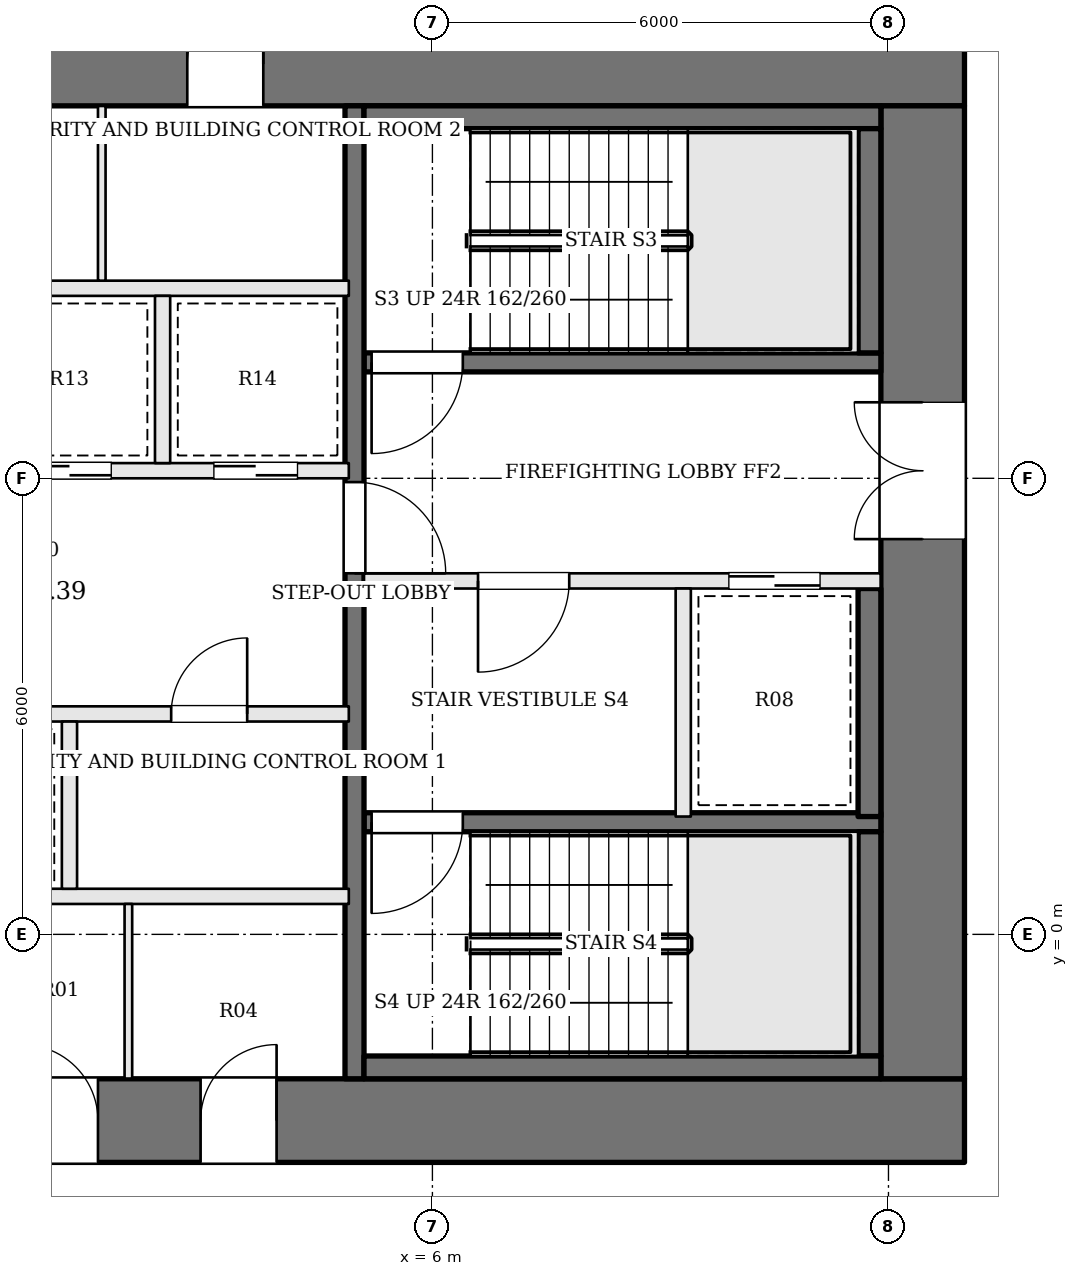
"""IFC4 building model, lengths in metres.
Left out: names, types, materials, properties, quantities, classifications, styles, units other than length and angle.
Written with IfcOpenShell. Run it as: python <this file> out.ifc"""

import sys

from ifc_helpers import new_model, si_unit, direction, frame, frame_2d, origin, place, context, subcontext, project, spatial, rectangle, extrude, element, fill, save


model = new_model("IFC4")
c1 = context("Model", 3, precision=1e-05, world=origin(), true_north=direction((0.0, 1.0)))
c2 = subcontext(c1, "Body", "Model", "MODEL_VIEW")
j1 = project(units=[si_unit("LENGTHUNIT", "METRE"), si_unit("PLANEANGLEUNIT", "RADIAN")], contexts=[c1])
p1 = place(None, origin())
s1 = spatial("IfcSite", under=j1, at=p1, CompositionType="ELEMENT")
p2 = place(p1, origin())
s2 = spatial("IfcBuilding", under=s1, at=p2, CompositionType="ELEMENT")
p3 = place(p2, frame((0.0, 0.0, 146.1)))
s3 = spatial("IfcBuildingStorey", under=s2, at=p3, CompositionType="ELEMENT", Elevation=146.1)
p4 = place(p3, frame((-13.0, 11.45, 0.0), z_axis=(0.0, 0.0, 1.0), x_axis=(1.0, 0.0, 0.0)))
e1 = element("IfcWall", 1, at=p4, inside=s3, PredefinedType="SHEAR", context=c2, shape_type="SweptSolid", body=[
    extrude(rectangle(XDim=26.0, YDim=1.1, at=frame_2d((13.0, 0.0))), origin(), (0.0, 0.0, 1.0), 3.9),
])
p5 = place(p4, frame((8.975, 0.0, 0.0)))
e2 = element("IfcOpeningElement", 2, at=p5, cuts=e1, PredefinedType="OPENING", context=c2, shape_type="SweptSolid", body=[
    extrude(rectangle(XDim=0.7, YDim=2.1, at=frame_2d((0.35, 1.05))), frame((0.0, 0.56, 0.0), z_axis=(0.0, -1.0, 0.0), x_axis=(1.0, 0.0, 0.0)), (0.0, 0.0, 1.0), 1.12),
])
p6 = place(p4, frame((11.025, 0.0, 0.0)))
e3 = element("IfcOpeningElement", 3, at=p6, cuts=e1, PredefinedType="OPENING", context=c2, shape_type="SweptSolid", body=[
    extrude(rectangle(XDim=0.7, YDim=2.1, at=frame_2d((0.35, 1.05))), frame((0.0, 0.56, 0.0), z_axis=(0.0, -1.0, 0.0), x_axis=(1.0, 0.0, 0.0)), (0.0, 0.0, 1.0), 1.12),
])
p7 = place(p4, frame((12.925, 0.0, 0.0)))
e4 = element("IfcOpeningElement", 4, at=p7, cuts=e1, PredefinedType="OPENING", context=c2, shape_type="SweptSolid", body=[
    extrude(rectangle(XDim=1.0, YDim=2.1, at=frame_2d((0.5, 1.05))), frame((0.0, 0.56, 0.0), z_axis=(0.0, -1.0, 0.0), x_axis=(1.0, 0.0, 0.0)), (0.0, 0.0, 1.0), 1.12),
])
p8 = place(p4, frame((15.775, 0.0, 0.0)))
e5 = element("IfcOpeningElement", 5, at=p8, cuts=e1, PredefinedType="OPENING", context=c2, shape_type="SweptSolid", body=[
    extrude(rectangle(XDim=1.0, YDim=2.1, at=frame_2d((0.5, 1.05))), frame((0.0, 0.56, 0.0), z_axis=(0.0, -1.0, 0.0), x_axis=(1.0, 0.0, 0.0)), (0.0, 0.0, 1.0), 1.12),
])
p9 = place(p3, frame((-13.0, -2.45, 0.0), z_axis=(0.0, 0.0, 1.0), x_axis=(1.0, 0.0, 0.0)))
e6 = element("IfcWall", 6, at=p9, inside=s3, PredefinedType="SHEAR", context=c2, shape_type="SweptSolid", body=[
    extrude(rectangle(XDim=26.0, YDim=1.1, at=frame_2d((13.0, 0.0))), origin(), (0.0, 0.0, 1.0), 3.9),
])
p10 = place(p9, frame((8.925, 0.0, 0.0)))
e7 = element("IfcOpeningElement", 7, at=p10, cuts=e6, PredefinedType="OPENING", context=c2, shape_type="SweptSolid", body=[
    extrude(rectangle(XDim=0.9, YDim=2.1, at=frame_2d((0.45, 1.05))), frame((0.0, 0.56, 0.0), z_axis=(0.0, -1.0, 0.0), x_axis=(1.0, 0.0, 0.0)), (0.0, 0.0, 1.0), 1.12),
])
p11 = place(p9, frame((11.475, 0.0, 0.0)))
e8 = element("IfcOpeningElement", 8, at=p11, cuts=e6, PredefinedType="OPENING", context=c2, shape_type="SweptSolid", body=[
    extrude(rectangle(XDim=0.9, YDim=2.1, at=frame_2d((0.45, 1.05))), frame((0.0, 0.56, 0.0), z_axis=(0.0, -1.0, 0.0), x_axis=(1.0, 0.0, 0.0)), (0.0, 0.0, 1.0), 1.12),
])
p12 = place(p9, frame((13.6, 0.0, 0.0)))
e9 = element("IfcOpeningElement", 9, at=p12, cuts=e6, PredefinedType="OPENING", context=c2, shape_type="SweptSolid", body=[
    extrude(rectangle(XDim=1.0, YDim=2.1, at=frame_2d((0.5, 1.05))), frame((0.0, 0.56, 0.0), z_axis=(0.0, -1.0, 0.0), x_axis=(1.0, 0.0, 0.0)), (0.0, 0.0, 1.0), 1.12),
])
p13 = place(p9, frame((15.95, 0.0, 0.0)))
e10 = element("IfcOpeningElement", 10, at=p13, cuts=e6, PredefinedType="OPENING", context=c2, shape_type="SweptSolid", body=[
    extrude(rectangle(XDim=1.0, YDim=2.1, at=frame_2d((0.5, 1.05))), frame((0.0, 0.56, 0.0), z_axis=(0.0, -1.0, 0.0), x_axis=(1.0, 0.0, 0.0)), (0.0, 0.0, 1.0), 1.12),
])
p14 = place(p3, frame((12.45, -1.9, 0.0), z_axis=(0.0, 0.0, 1.0), x_axis=(0.0, 1.0, 0.0)))
e11 = element("IfcWall", 11, at=p14, inside=s3, PredefinedType="SHEAR", context=c2, shape_type="SweptSolid", body=[
    extrude(rectangle(XDim=12.8, YDim=1.1, at=frame_2d((6.4, 0.0))), origin(), (0.0, 0.0, 1.0), 3.9),
])
p15 = place(p14, frame((7.1, 0.0, 0.0)))
e12 = element("IfcOpeningElement", 12, at=p15, cuts=e11, PredefinedType="OPENING", context=c2, shape_type="SweptSolid", body=[
    extrude(rectangle(XDim=1.8, YDim=2.1, at=frame_2d((0.9, 1.05))), frame((0.0, 0.56, 0.0), z_axis=(0.0, -1.0, 0.0), x_axis=(1.0, 0.0, 0.0)), (0.0, 0.0, 1.0), 1.12),
])
p16 = place(p3, frame((11.9, 7.525, 0.0), z_axis=(0.0, 0.0, 1.0), x_axis=(-1.0, 0.0, 0.0)))
e13 = element("IfcWall", 13, at=p16, inside=s3, PredefinedType="SOLIDWALL", context=c2, shape_type="SweptSolid", body=[
    extrude(rectangle(XDim=6.8, YDim=0.25, at=frame_2d((3.4, 0.0))), origin(), (0.0, 0.0, 1.0), 3.7),
])
p17 = place(p16, frame((5.5, 0.0, 0.0)))
e14 = element("IfcOpeningElement", 14, at=p17, cuts=e13, PredefinedType="OPENING", context=c2, shape_type="SweptSolid", body=[
    extrude(rectangle(XDim=1.2, YDim=2.1, at=frame_2d((0.6, 1.05))), frame((0.0, 0.135, 0.0), z_axis=(0.0, -1.0, 0.0), x_axis=(1.0, 0.0, 0.0)), (0.0, 0.0, 1.0), 0.27),
])
p18 = place(p3, frame((11.9, 4.65, 0.0), z_axis=(0.0, 0.0, 1.0), x_axis=(-1.0, 0.0, 0.0)))
e15 = element("IfcWall", 15, at=p18, inside=s3, PredefinedType="SOLIDWALL", context=c2, shape_type="SweptSolid", body=[
    extrude(rectangle(XDim=6.8, YDim=0.2, at=frame_2d((3.4, 0.0))), origin(), (0.0, 0.0, 1.0), 3.7),
])
p19 = place(p18, frame((4.1, 0.0, 0.0)))
e16 = element("IfcOpeningElement", 16, at=p19, cuts=e15, PredefinedType="OPENING", context=c2, shape_type="SweptSolid", body=[
    extrude(rectangle(XDim=1.2, YDim=2.1, at=frame_2d((0.6, 1.05))), frame((0.0, 0.11, 0.0), z_axis=(0.0, -1.0, 0.0), x_axis=(1.0, 0.0, 0.0)), (0.0, 0.0, 1.0), 0.22),
])
p20 = place(p18, frame((0.8, 0.0, 0.0)))
e17 = element("IfcOpeningElement", 17, at=p20, cuts=e15, PredefinedType="OPENING", context=c2, shape_type="SweptSolid", body=[
    extrude(rectangle(XDim=1.2, YDim=2.1, at=frame_2d((0.6, 1.05))), frame((0.0, 0.11, 0.0), z_axis=(0.0, -1.0, 0.0), x_axis=(1.0, 0.0, 0.0)), (0.0, 0.0, 1.0), 0.22),
])
p21 = place(p3, frame((11.9, 1.475, 0.0), z_axis=(0.0, 0.0, 1.0), x_axis=(-1.0, 0.0, 0.0)))
e18 = element("IfcWall", 18, at=p21, inside=s3, PredefinedType="SOLIDWALL", context=c2, shape_type="SweptSolid", body=[
    extrude(rectangle(XDim=6.8, YDim=0.25, at=frame_2d((3.4, 0.0))), origin(), (0.0, 0.0, 1.0), 3.7),
])
p22 = place(p21, frame((5.5, 0.0, 0.0)))
e19 = element("IfcOpeningElement", 19, at=p22, cuts=e18, PredefinedType="OPENING", context=c2, shape_type="SweptSolid", body=[
    extrude(rectangle(XDim=1.2, YDim=2.1, at=frame_2d((0.6, 1.05))), frame((0.0, 0.135, 0.0), z_axis=(0.0, -1.0, 0.0), x_axis=(1.0, 0.0, 0.0)), (0.0, 0.0, 1.0), 0.27),
])
p23 = place(p3, frame((9.3, 4.55, 0.0), z_axis=(0.0, 0.0, 1.0), x_axis=(0.0, -1.0, 0.0)))
e20 = element("IfcWall", 20, at=p23, inside=s3, PredefinedType="SOLIDWALL", context=c2, shape_type="SweptSolid", body=[
    extrude(rectangle(XDim=3.0, YDim=0.2, at=frame_2d((1.5, 0.0))), origin(), (0.0, 0.0, 1.0), 3.7),
])
p24 = place(p3, frame((4.975, 10.9, 0.0), z_axis=(0.0, 0.0, 1.0), x_axis=(0.0, -1.0, 0.0)))
e21 = element("IfcWall", 21, at=p24, inside=s3, PredefinedType="SOLIDWALL", context=c2, shape_type="SweptSolid", body=[
    extrude(rectangle(XDim=12.8, YDim=0.25, at=frame_2d((6.4, 0.0))), origin(), (0.0, 0.0, 1.0), 3.7),
])
p25 = place(p24, frame((4.95, 0.0, 0.0)))
e22 = element("IfcOpeningElement", 22, at=p25, cuts=e21, PredefinedType="OPENING", context=c2, shape_type="SweptSolid", body=[
    extrude(rectangle(XDim=1.2, YDim=2.1, at=frame_2d((0.6, 1.05))), frame((0.0, 0.135, 0.0), z_axis=(0.0, -1.0, 0.0), x_axis=(1.0, 0.0, 0.0)), (0.0, 0.0, 1.0), 0.27),
])
p26 = place(p3, frame((11.9, 10.75, 0.0), z_axis=(0.0, 0.0, 1.0), x_axis=(-1.0, 0.0, 0.0)))
e23 = element("IfcWall", 23, at=p26, inside=s3, PredefinedType="SOLIDWALL", context=c2, shape_type="SweptSolid", body=[
    extrude(rectangle(XDim=6.8, YDim=0.3, at=frame_2d((3.4, 0.0))), origin(), (0.0, 0.0, 1.0), 3.7),
])
p27 = place(p3, frame((11.75, 10.6, 0.0), z_axis=(0.0, 0.0, 1.0), x_axis=(0.0, -1.0, 0.0)))
e24 = element("IfcWall", 24, at=p27, inside=s3, PredefinedType="SOLIDWALL", context=c2, shape_type="SweptSolid", body=[
    extrude(rectangle(XDim=2.95, YDim=0.3, at=frame_2d((1.475, 0.0))), origin(), (0.0, 0.0, 1.0), 3.7),
])
p28 = place(p3, frame((11.75, 4.55, 0.0), z_axis=(0.0, 0.0, 1.0), x_axis=(0.0, -1.0, 0.0)))
e25 = element("IfcWall", 25, at=p28, inside=s3, PredefinedType="SOLIDWALL", context=c2, shape_type="SweptSolid", body=[
    extrude(rectangle(XDim=3.0, YDim=0.3, at=frame_2d((1.5, 0.0))), origin(), (0.0, 0.0, 1.0), 3.7),
])
p29 = place(p3, frame((11.75, 1.35, 0.0), z_axis=(0.0, 0.0, 1.0), x_axis=(0.0, -1.0, 0.0)))
e26 = element("IfcWall", 26, at=p29, inside=s3, PredefinedType="SOLIDWALL", context=c2, shape_type="SweptSolid", body=[
    extrude(rectangle(XDim=2.95, YDim=0.3, at=frame_2d((1.475, 0.0))), origin(), (0.0, 0.0, 1.0), 3.7),
])
p30 = place(p3, frame((11.9, -1.75, 0.0), z_axis=(0.0, 0.0, 1.0), x_axis=(-1.0, 0.0, 0.0)))
e27 = element("IfcWall", 27, at=p30, inside=s3, PredefinedType="SOLIDWALL", context=c2, shape_type="SweptSolid", body=[
    extrude(rectangle(XDim=6.8, YDim=0.3, at=frame_2d((3.4, 0.0))), origin(), (0.0, 0.0, 1.0), 3.7),
])
p31 = place(p3, frame((-4.9, 0.5, 0.0), z_axis=(0.0, 0.0, 1.0), x_axis=(1.0, 0.0, 0.0)))
e28 = element("IfcWall", 28, at=p31, inside=s3, PredefinedType="SOLIDWALL", context=c2, shape_type="SweptSolid", body=[
    extrude(rectangle(XDim=9.8, YDim=0.2, at=frame_2d((4.9, 0.0))), origin(), (0.0, 0.0, 1.0), 3.7),
])
p32 = place(p3, frame((-4.9, 2.9, 0.0), z_axis=(0.0, 0.0, 1.0), x_axis=(1.0, 0.0, 0.0)))
e29 = element("IfcWall", 29, at=p32, inside=s3, PredefinedType="SOLIDWALL", context=c2, shape_type="SweptSolid", body=[
    extrude(rectangle(XDim=9.8, YDim=0.2, at=frame_2d((4.9, 0.0))), origin(), (0.0, 0.0, 1.0), 3.7),
])
p33 = place(p32, frame((0.675, 0.0, 0.0)))
e30 = element("IfcOpeningElement", 30, at=p33, cuts=e29, PredefinedType="OPENING", context=c2, shape_type="SweptSolid", body=[
    extrude(rectangle(XDim=1.1, YDim=2.1, at=frame_2d((0.55, 1.05))), frame((0.0, 0.11, 0.0), z_axis=(0.0, -1.0, 0.0), x_axis=(1.0, 0.0, 0.0)), (0.0, 0.0, 1.0), 0.22),
])
p34 = place(p32, frame((2.613, 0.0, 0.0)))
e31 = element("IfcOpeningElement", 31, at=p34, cuts=e29, PredefinedType="OPENING", context=c2, shape_type="SweptSolid", body=[
    extrude(rectangle(XDim=0.9, YDim=2.1, at=frame_2d((0.45, 1.05))), frame((0.0, 0.11, 0.0), z_axis=(0.0, -1.0, 0.0), x_axis=(1.0, 0.0, 0.0)), (0.0, 0.0, 1.0), 0.22),
])
p35 = place(p32, frame((4.35, 0.0, 0.0)))
e32 = element("IfcOpeningElement", 32, at=p35, cuts=e29, PredefinedType="OPENING", context=c2, shape_type="SweptSolid", body=[
    extrude(rectangle(XDim=1.1, YDim=2.1, at=frame_2d((0.55, 1.05))), frame((0.0, 0.11, 0.0), z_axis=(0.0, -1.0, 0.0), x_axis=(1.0, 0.0, 0.0)), (0.0, 0.0, 1.0), 0.22),
])
p36 = place(p32, frame((7.463, 0.0, 0.0)))
e33 = element("IfcOpeningElement", 33, at=p36, cuts=e29, PredefinedType="OPENING", context=c2, shape_type="SweptSolid", body=[
    extrude(rectangle(XDim=1.0, YDim=2.1, at=frame_2d((0.5, 1.05))), frame((0.0, 0.11, 0.0), z_axis=(0.0, -1.0, 0.0), x_axis=(1.0, 0.0, 0.0)), (0.0, 0.0, 1.0), 0.22),
])
p37 = place(p3, frame((-4.9, 6.1, 0.0), z_axis=(0.0, 0.0, 1.0), x_axis=(1.0, 0.0, 0.0)))
e34 = element("IfcWall", 34, at=p37, inside=s3, PredefinedType="SOLIDWALL", context=c2, shape_type="SweptSolid", body=[
    extrude(rectangle(XDim=9.8, YDim=0.2, at=frame_2d((4.9, 0.0))), origin(), (0.0, 0.0, 1.0), 3.7),
])
p38 = place(p37, frame((0.675, 0.0, 0.0)))
e35 = element("IfcOpeningElement", 35, at=p38, cuts=e34, PredefinedType="OPENING", context=c2, shape_type="SweptSolid", body=[
    extrude(rectangle(XDim=1.1, YDim=2.1, at=frame_2d((0.55, 1.05))), frame((0.0, 0.11, 0.0), z_axis=(0.0, -1.0, 0.0), x_axis=(1.0, 0.0, 0.0)), (0.0, 0.0, 1.0), 0.22),
])
p39 = place(p37, frame((3.125, 0.0, 0.0)))
e36 = element("IfcOpeningElement", 36, at=p39, cuts=e34, PredefinedType="OPENING", context=c2, shape_type="SweptSolid", body=[
    extrude(rectangle(XDim=1.1, YDim=2.1, at=frame_2d((0.55, 1.05))), frame((0.0, 0.11, 0.0), z_axis=(0.0, -1.0, 0.0), x_axis=(1.0, 0.0, 0.0)), (0.0, 0.0, 1.0), 0.22),
])
p40 = place(p37, frame((5.575, 0.0, 0.0)))
e37 = element("IfcOpeningElement", 37, at=p40, cuts=e34, PredefinedType="OPENING", context=c2, shape_type="SweptSolid", body=[
    extrude(rectangle(XDim=1.1, YDim=2.1, at=frame_2d((0.55, 1.05))), frame((0.0, 0.11, 0.0), z_axis=(0.0, -1.0, 0.0), x_axis=(1.0, 0.0, 0.0)), (0.0, 0.0, 1.0), 0.22),
])
p41 = place(p37, frame((8.025, 0.0, 0.0)))
e38 = element("IfcOpeningElement", 38, at=p41, cuts=e34, PredefinedType="OPENING", context=c2, shape_type="SweptSolid", body=[
    extrude(rectangle(XDim=1.1, YDim=2.1, at=frame_2d((0.55, 1.05))), frame((0.0, 0.11, 0.0), z_axis=(0.0, -1.0, 0.0), x_axis=(1.0, 0.0, 0.0)), (0.0, 0.0, 1.0), 0.22),
])
p42 = place(p3, frame((-4.9, 8.5, 0.0), z_axis=(0.0, 0.0, 1.0), x_axis=(1.0, 0.0, 0.0)))
e39 = element("IfcWall", 39, at=p42, inside=s3, PredefinedType="SOLIDWALL", context=c2, shape_type="SweptSolid", body=[
    extrude(rectangle(XDim=9.8, YDim=0.2, at=frame_2d((4.9, 0.0))), origin(), (0.0, 0.0, 1.0), 3.7),
])
for number, where, z_axis, x_axis in (
    (40, (1.225, 0.6, 0.0), (0.0, 0.0, 1.0), (0.0, 1.0, 0.0)),
    (41, (2.45, 6.2, 0.0), (0.0, 0.0, 1.0), (0.0, 1.0, 0.0)),
):
    element("IfcWall", number, at=place(p3, frame(where, z_axis=z_axis, x_axis=x_axis)), inside=s3, PredefinedType="SOLIDWALL", context=c2, shape_type="SweptSolid", body=[
        extrude(rectangle(XDim=2.2, YDim=0.2, at=frame_2d((1.1, 0.0))), origin(), (0.0, 0.0, 1.0), 3.7),
    ])
for number, where, z_axis, x_axis in (
    (42, (2.0, -1.9, 0.0), (0.0, 0.0, 1.0), (0.0, 1.0, 0.0)),
    (43, (1.65, 8.6, 0.0), (0.0, 0.0, 1.0), (0.0, 1.0, 0.0)),
):
    element("IfcWall", number, at=place(p3, frame(where, z_axis=z_axis, x_axis=x_axis)), inside=s3, PredefinedType="PARTITIONING", context=c2, shape_type="SweptSolid", body=[
        extrude(rectangle(XDim=2.3, YDim=0.1, at=frame_2d((1.15, 0.0))), origin(), (0.0, 0.0, 1.0), 3.7),
    ])
p43 = place(p15, origin())
e44 = element("IfcDoor", 44, at=p43, inside=s3, OperationType="DOUBLE_DOOR_SINGLE_SWING", PredefinedType="DOOR", context=c2, shape_type="SweptSolid", body=[
    extrude(rectangle(XDim=1.8, YDim=2.1, at=frame_2d((0.9, 1.05))), frame((0.0, 0.025, 0.0), z_axis=(0.0, -1.0, 0.0), x_axis=(1.0, 0.0, 0.0)), (0.0, 0.0, 1.0), 0.05),
])
fill(e12, e44)
p44 = place(p25, origin())
e45 = element("IfcDoor", 45, at=p44, inside=s3, OperationType="SINGLE_SWING_RIGHT", PredefinedType="DOOR", context=c2, shape_type="SweptSolid", body=[
    extrude(rectangle(XDim=1.2, YDim=2.1, at=frame_2d((0.6, 1.05))), frame((0.0, 0.025, 0.0), z_axis=(0.0, -1.0, 0.0), x_axis=(1.0, 0.0, 0.0)), (0.0, 0.0, 1.0), 0.05),
])
fill(e22, e45)
p45 = place(p19, origin())
e46 = element("IfcDoor", 46, at=p45, inside=s3, OperationType="SINGLE_SWING_RIGHT", PredefinedType="DOOR", context=c2, shape_type="SweptSolid", body=[
    extrude(rectangle(XDim=1.2, YDim=2.1, at=frame_2d((0.6, 1.05))), frame((0.0, 0.025, 0.0), z_axis=(0.0, -1.0, 0.0), x_axis=(1.0, 0.0, 0.0)), (0.0, 0.0, 1.0), 0.05),
])
fill(e16, e46)
p46 = place(p17, origin())
e47 = element("IfcDoor", 47, at=p46, inside=s3, OperationType="SINGLE_SWING_RIGHT", PredefinedType="DOOR", context=c2, shape_type="SweptSolid", body=[
    extrude(rectangle(XDim=1.2, YDim=2.1, at=frame_2d((0.6, 1.05))), frame((0.0, 0.025, 0.0), z_axis=(0.0, -1.0, 0.0), x_axis=(1.0, 0.0, 0.0)), (0.0, 0.0, 1.0), 0.05),
])
fill(e14, e47)
p47 = place(p22, origin())
e48 = element("IfcDoor", 48, at=p47, inside=s3, OperationType="SINGLE_SWING_RIGHT", PredefinedType="DOOR", context=c2, shape_type="SweptSolid", body=[
    extrude(rectangle(XDim=1.2, YDim=2.1, at=frame_2d((0.6, 1.05))), frame((0.0, 0.025, 0.0), z_axis=(0.0, -1.0, 0.0), x_axis=(1.0, 0.0, 0.0)), (0.0, 0.0, 1.0), 0.05),
])
fill(e19, e48)
p48 = place(p20, origin())
e49 = element("IfcDoor", 49, at=p48, inside=s3, OperationType="SLIDING_TO_RIGHT", PredefinedType="DOOR", context=c2, shape_type="SweptSolid", body=[
    extrude(rectangle(XDim=1.2, YDim=2.1, at=frame_2d((0.6, 1.05))), frame((0.0, 0.025, 0.0), z_axis=(0.0, -1.0, 0.0), x_axis=(1.0, 0.0, 0.0)), (0.0, 0.0, 1.0), 0.05),
])
fill(e17, e49)
p49 = place(p36, origin())
e50 = element("IfcDoor", 50, at=p49, inside=s3, OperationType="SINGLE_SWING_RIGHT", PredefinedType="DOOR", context=c2, shape_type="SweptSolid", body=[
    extrude(rectangle(XDim=1.0, YDim=2.1, at=frame_2d((0.5, 1.05))), frame((0.0, 0.025, 0.0), z_axis=(0.0, -1.0, 0.0), x_axis=(1.0, 0.0, 0.0)), (0.0, 0.0, 1.0), 0.05),
])
fill(e33, e50)
p50 = place(p40, origin())
e51 = element("IfcDoor", 51, at=p50, inside=s3, OperationType="SLIDING_TO_RIGHT", PredefinedType="DOOR", context=c2, shape_type="SweptSolid", body=[
    extrude(rectangle(XDim=1.1, YDim=2.1, at=frame_2d((0.55, 1.05))), frame((0.0, 0.025, 0.0), z_axis=(0.0, -1.0, 0.0), x_axis=(1.0, 0.0, 0.0)), (0.0, 0.0, 1.0), 0.05),
])
fill(e37, e51)
p51 = place(p41, origin())
e52 = element("IfcDoor", 52, at=p51, inside=s3, OperationType="SLIDING_TO_LEFT", PredefinedType="DOOR", context=c2, shape_type="SweptSolid", body=[
    extrude(rectangle(XDim=1.1, YDim=2.1, at=frame_2d((0.55, 1.05))), frame((0.0, 0.025, 0.0), z_axis=(0.0, -1.0, 0.0), x_axis=(1.0, 0.0, 0.0)), (0.0, 0.0, 1.0), 0.05),
])
fill(e38, e52)
p52 = place(p12, origin())
e53 = element("IfcDoor", 53, at=p52, inside=s3, OperationType="SINGLE_SWING_LEFT", PredefinedType="DOOR", context=c2, shape_type="SweptSolid", body=[
    extrude(rectangle(XDim=1.0, YDim=2.1, at=frame_2d((0.5, 1.05))), frame((0.0, 0.025, 0.0), z_axis=(0.0, -1.0, 0.0), x_axis=(1.0, 0.0, 0.0)), (0.0, 0.0, 1.0), 0.05),
])
fill(e9, e53)
p53 = place(p13, origin())
e54 = element("IfcDoor", 54, at=p53, inside=s3, OperationType="SINGLE_SWING_RIGHT", PredefinedType="DOOR", context=c2, shape_type="SweptSolid", body=[
    extrude(rectangle(XDim=1.0, YDim=2.1, at=frame_2d((0.5, 1.05))), frame((0.0, 0.025, 0.0), z_axis=(0.0, -1.0, 0.0), x_axis=(1.0, 0.0, 0.0)), (0.0, 0.0, 1.0), 0.05),
])
fill(e10, e54)
p54 = place(p8, origin())
e55 = element("IfcDoor", 55, at=p54, inside=s3, OperationType="SINGLE_SWING_RIGHT", PredefinedType="DOOR", context=c2, shape_type="SweptSolid", body=[
    extrude(rectangle(XDim=1.0, YDim=2.1, at=frame_2d((0.5, 1.05))), frame((0.0, 0.025, 0.0), z_axis=(0.0, -1.0, 0.0), x_axis=(1.0, 0.0, 0.0)), (0.0, 0.0, 1.0), 0.05),
])
fill(e5, e55)
save(model, sys.argv[1])
